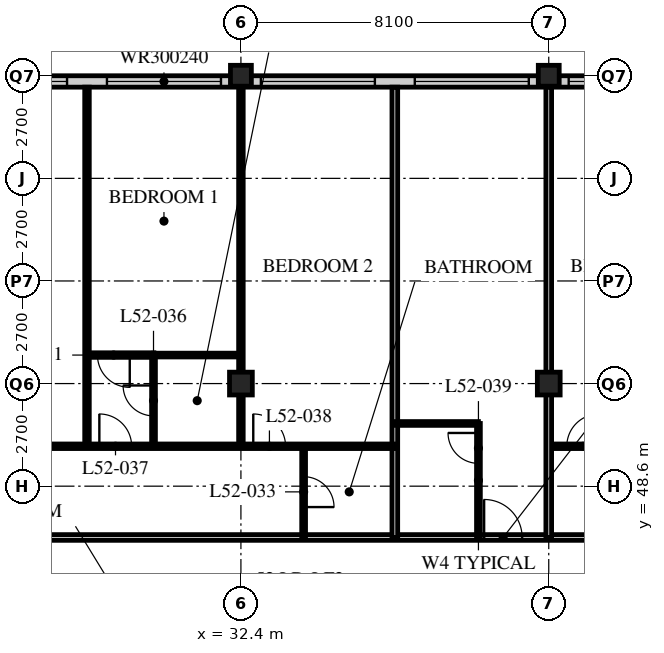
"""IFC4 building model, lengths in metres.
Left out: names, types, materials, properties, quantities, classifications, styles, units other than length and angle.
Written with IfcOpenShell. Run it as: python <this file> out.ifc"""

import sys

from ifc_helpers import new_model, si_unit, direction, frame, frame_2d, origin, origin_2d, place, context, subcontext, project, spatial, rectangle, hollow_rectangle, extrude, element, fill, save


model = new_model("IFC4")
c1 = context("Model", 3, precision=1e-05, world=origin(), true_north=direction((0.0, 1.0)))
c2 = subcontext(c1, "Body", "Model", "MODEL_VIEW")
j1 = project(units=[si_unit("LENGTHUNIT", "METRE"), si_unit("PLANEANGLEUNIT", "RADIAN")], contexts=[c1])
p1 = place(None, origin())
s1 = spatial("IfcSite", under=j1, at=p1, CompositionType="ELEMENT")
p2 = place(p1, origin())
s2 = spatial("IfcBuilding", under=s1, at=p2, CompositionType="ELEMENT")
p3 = place(p2, frame((0.0, 0.0, 202.8)))
s3 = spatial("IfcBuildingStorey", under=s2, at=p3, CompositionType="ELEMENT", Elevation=202.8)
p4 = place(p3, frame((32.4, 51.3, 0.0), z_axis=(0.0, 0.0, 1.0), x_axis=(1.0, 0.0, 0.0)))
e1 = element("IfcColumn", 1, at=p4, inside=s3, PredefinedType="COLUMN", context=c2, shape_type="SweptSolid", body=[
    extrude(hollow_rectangle(XDim=0.6, YDim=0.6, WallThickness=0.05, at=origin_2d()), origin(), (0.0, 0.0, 1.0), 3.6),
])
p5 = place(p3, frame((32.4, 59.4, 0.0), z_axis=(0.0, 0.0, 1.0), x_axis=(1.0, 0.0, 0.0)))
e2 = element("IfcColumn", 2, at=p5, inside=s3, PredefinedType="COLUMN", context=c2, shape_type="SweptSolid", body=[
    extrude(hollow_rectangle(XDim=0.55, YDim=0.55, WallThickness=0.045, at=origin_2d()), origin(), (0.0, 0.0, 1.0), 3.6),
])
p6 = place(p3, frame((40.5, 51.3, 0.0), z_axis=(0.0, 0.0, 1.0), x_axis=(1.0, 0.0, 0.0)))
e3 = element("IfcColumn", 3, at=p6, inside=s3, PredefinedType="COLUMN", context=c2, shape_type="SweptSolid", body=[
    extrude(hollow_rectangle(XDim=0.6, YDim=0.6, WallThickness=0.05, at=origin_2d()), origin(), (0.0, 0.0, 1.0), 3.6),
])
p7 = place(p3, frame((40.5, 59.4, 0.0), z_axis=(0.0, 0.0, 1.0), x_axis=(1.0, 0.0, 0.0)))
e4 = element("IfcColumn", 4, at=p7, inside=s3, PredefinedType="COLUMN", context=c2, shape_type="SweptSolid", body=[
    extrude(hollow_rectangle(XDim=0.55, YDim=0.55, WallThickness=0.045, at=origin_2d()), origin(), (0.0, 0.0, 1.0), 3.6),
])
p8 = place(p3, frame((48.3, 59.25, 0.0), z_axis=(0.0, 0.0, 1.0), x_axis=(-1.0, 0.0, 0.0)))
e5 = element("IfcWall", 5, at=p8, inside=s3, PredefinedType="SOLIDWALL", context=c2, shape_type="SweptSolid", body=[
    extrude(rectangle(XDim=40.2, YDim=0.3, at=frame_2d((20.1, 0.0))), origin(), (0.0, 0.0, 1.0), 3.39),
])
p9 = place(p8, frame((0.225, 0.0, 0.6)))
e6 = element("IfcOpeningElement", 6, at=p9, cuts=e5, PredefinedType="OPENING", context=c2, shape_type="SweptSolid", body=[
    extrude(rectangle(XDim=3.0, YDim=2.4, at=frame_2d((1.5, 1.2))), frame((0.0, 0.16, 0.0), z_axis=(0.0, -1.0, 0.0), x_axis=(1.0, 0.0, 0.0)), (0.0, 0.0, 1.0), 0.32),
])
p10 = place(p8, frame((4.275, 0.0, 0.6)))
e7 = element("IfcOpeningElement", 7, at=p10, cuts=e5, PredefinedType="OPENING", context=c2, shape_type="SweptSolid", body=[
    extrude(rectangle(XDim=3.0, YDim=2.4, at=frame_2d((1.5, 1.2))), frame((0.0, 0.16, 0.0), z_axis=(0.0, -1.0, 0.0), x_axis=(1.0, 0.0, 0.0)), (0.0, 0.0, 1.0), 0.32),
])
p11 = place(p8, frame((8.325, 0.0, 0.6)))
e8 = element("IfcOpeningElement", 8, at=p11, cuts=e5, PredefinedType="OPENING", context=c2, shape_type="SweptSolid", body=[
    extrude(rectangle(XDim=3.0, YDim=2.4, at=frame_2d((1.5, 1.2))), frame((0.0, 0.16, 0.0), z_axis=(0.0, -1.0, 0.0), x_axis=(1.0, 0.0, 0.0)), (0.0, 0.0, 1.0), 0.32),
])
p12 = place(p8, frame((12.375, 0.0, 0.6)))
e9 = element("IfcOpeningElement", 9, at=p12, cuts=e5, PredefinedType="OPENING", context=c2, shape_type="SweptSolid", body=[
    extrude(rectangle(XDim=3.0, YDim=2.4, at=frame_2d((1.5, 1.2))), frame((0.0, 0.16, 0.0), z_axis=(0.0, -1.0, 0.0), x_axis=(1.0, 0.0, 0.0)), (0.0, 0.0, 1.0), 0.32),
])
p13 = place(p8, frame((16.425, 0.0, 0.6)))
e10 = element("IfcOpeningElement", 10, at=p13, cuts=e5, PredefinedType="OPENING", context=c2, shape_type="SweptSolid", body=[
    extrude(rectangle(XDim=3.0, YDim=2.4, at=frame_2d((1.5, 1.2))), frame((0.0, 0.16, 0.0), z_axis=(0.0, -1.0, 0.0), x_axis=(1.0, 0.0, 0.0)), (0.0, 0.0, 1.0), 0.32),
])
p14 = place(p8, frame((20.475, 0.0, 0.6)))
e11 = element("IfcOpeningElement", 11, at=p14, cuts=e5, PredefinedType="OPENING", context=c2, shape_type="SweptSolid", body=[
    extrude(rectangle(XDim=3.0, YDim=2.4, at=frame_2d((1.5, 1.2))), frame((0.0, 0.16, 0.0), z_axis=(0.0, -1.0, 0.0), x_axis=(1.0, 0.0, 0.0)), (0.0, 0.0, 1.0), 0.32),
])
p15 = place(p8, frame((24.525, 0.0, 0.6)))
e12 = element("IfcOpeningElement", 12, at=p15, cuts=e5, PredefinedType="OPENING", context=c2, shape_type="SweptSolid", body=[
    extrude(rectangle(XDim=3.0, YDim=2.4, at=frame_2d((1.5, 1.2))), frame((0.0, 0.16, 0.0), z_axis=(0.0, -1.0, 0.0), x_axis=(1.0, 0.0, 0.0)), (0.0, 0.0, 1.0), 0.32),
])
p16 = place(p8, frame((28.575, 0.0, 0.6)))
e13 = element("IfcOpeningElement", 13, at=p16, cuts=e5, PredefinedType="OPENING", context=c2, shape_type="SweptSolid", body=[
    extrude(rectangle(XDim=3.0, YDim=2.4, at=frame_2d((1.5, 1.2))), frame((0.0, 0.16, 0.0), z_axis=(0.0, -1.0, 0.0), x_axis=(1.0, 0.0, 0.0)), (0.0, 0.0, 1.0), 0.32),
])
p17 = place(p8, frame((32.625, 0.0, 0.6)))
e14 = element("IfcOpeningElement", 14, at=p17, cuts=e5, PredefinedType="OPENING", context=c2, shape_type="SweptSolid", body=[
    extrude(rectangle(XDim=3.0, YDim=2.4, at=frame_2d((1.5, 1.2))), frame((0.0, 0.16, 0.0), z_axis=(0.0, -1.0, 0.0), x_axis=(1.0, 0.0, 0.0)), (0.0, 0.0, 1.0), 0.32),
])
p18 = place(p8, frame((36.675, 0.0, 0.6)))
e15 = element("IfcOpeningElement", 15, at=p18, cuts=e5, PredefinedType="OPENING", context=c2, shape_type="SweptSolid", body=[
    extrude(rectangle(XDim=3.0, YDim=2.4, at=frame_2d((1.5, 1.2))), frame((0.0, 0.16, 0.0), z_axis=(0.0, -1.0, 0.0), x_axis=(1.0, 0.0, 0.0)), (0.0, 0.0, 1.0), 0.32),
])
p19 = place(p3, frame((8.1, 47.25, 0.0), z_axis=(0.0, 0.0, 1.0), x_axis=(1.0, 0.0, 0.0)))
e16 = element("IfcWall", 16, at=p19, inside=s3, PredefinedType="PARTITIONING", context=c2, shape_type="SweptSolid", body=[
    extrude(rectangle(XDim=36.45, YDim=0.15, at=frame_2d((18.225, 0.0))), origin(), (0.0, 0.0, 1.0), 3.39),
])
p20 = place(p19, frame((4.45, 0.0, 0.0)))
e17 = element("IfcOpeningElement", 17, at=p20, cuts=e16, PredefinedType="OPENING", context=c2, shape_type="SweptSolid", body=[
    extrude(rectangle(XDim=1.0, YDim=2.1, at=frame_2d((0.5, 1.05))), frame((0.0, 0.085, 0.0), z_axis=(0.0, -1.0, 0.0), x_axis=(1.0, 0.0, 0.0)), (0.0, 0.0, 1.0), 0.17),
])
p21 = place(p19, frame((12.55, 0.0, 0.0)))
e18 = element("IfcOpeningElement", 18, at=p21, cuts=e16, PredefinedType="OPENING", context=c2, shape_type="SweptSolid", body=[
    extrude(rectangle(XDim=1.0, YDim=2.1, at=frame_2d((0.5, 1.05))), frame((0.0, 0.085, 0.0), z_axis=(0.0, -1.0, 0.0), x_axis=(1.0, 0.0, 0.0)), (0.0, 0.0, 1.0), 0.17),
])
p22 = place(p19, frame((30.7, 0.0, 0.0)))
e19 = element("IfcOpeningElement", 19, at=p22, cuts=e16, PredefinedType="OPENING", context=c2, shape_type="SweptSolid", body=[
    extrude(rectangle(XDim=1.0, YDim=2.1, at=frame_2d((0.5, 1.05))), frame((0.0, 0.085, 0.0), z_axis=(0.0, -1.0, 0.0), x_axis=(1.0, 0.0, 0.0)), (0.0, 0.0, 1.0), 0.17),
])
p23 = place(p19, frame((33.925, 0.0, 0.0)))
e20 = element("IfcOpeningElement", 20, at=p23, cuts=e16, PredefinedType="OPENING", context=c2, shape_type="SweptSolid", body=[
    extrude(rectangle(XDim=1.0, YDim=2.1, at=frame_2d((0.5, 1.05))), frame((0.0, 0.085, 0.0), z_axis=(0.0, -1.0, 0.0), x_axis=(1.0, 0.0, 0.0)), (0.0, 0.0, 1.0), 0.17),
])
p24 = place(p19, frame((1.525, 0.0, 0.0)))
e21 = element("IfcOpeningElement", 21, at=p24, cuts=e16, PredefinedType="OPENING", context=c2, shape_type="SweptSolid", body=[
    extrude(rectangle(XDim=1.0, YDim=2.1, at=frame_2d((0.5, 1.05))), frame((0.0, 0.085, 0.0), z_axis=(0.0, -1.0, 0.0), x_axis=(1.0, 0.0, 0.0)), (0.0, 0.0, 1.0), 0.17),
])
p25 = place(p3, frame((34.05, 47.25, 0.0), z_axis=(0.0, 0.0, 1.0), x_axis=(0.0, 1.0, 0.0)))
e22 = element("IfcWall", 22, at=p25, inside=s3, PredefinedType="PARTITIONING", context=c2, shape_type="SweptSolid", body=[
    extrude(rectangle(XDim=2.4, YDim=0.1, at=frame_2d((1.2, 0.0))), origin(), (0.0, 0.0, 1.0), 3.39),
])
p26 = place(p25, frame((0.8, 0.0, 0.0)))
e23 = element("IfcOpeningElement", 23, at=p26, cuts=e22, PredefinedType="OPENING", context=c2, shape_type="SweptSolid", body=[
    extrude(rectangle(XDim=0.8, YDim=2.1, at=frame_2d((0.4, 1.05))), frame((0.0, 0.06, 0.0), z_axis=(0.0, -1.0, 0.0), x_axis=(1.0, 0.0, 0.0)), (0.0, 0.0, 1.0), 0.12),
])
p27 = place(p3, frame((30.1, 49.65, 0.0), z_axis=(0.0, 0.0, 1.0), x_axis=(0.0, 1.0, 0.0)))
e24 = element("IfcWall", 24, at=p27, inside=s3, PredefinedType="PARTITIONING", context=c2, shape_type="SweptSolid", body=[
    extrude(rectangle(XDim=2.4, YDim=0.1, at=frame_2d((1.2, 0.0))), origin(), (0.0, 0.0, 1.0), 3.39),
])
p28 = place(p27, frame((0.8, 0.0, 0.0)))
e25 = element("IfcOpeningElement", 25, at=p28, cuts=e24, PredefinedType="OPENING", context=c2, shape_type="SweptSolid", body=[
    extrude(rectangle(XDim=0.8, YDim=2.1, at=frame_2d((0.4, 1.05))), frame((0.0, 0.06, 0.0), z_axis=(0.0, -1.0, 0.0), x_axis=(1.0, 0.0, 0.0)), (0.0, 0.0, 1.0), 0.12),
])
p29 = place(p3, frame((30.1, 52.05, 0.0), z_axis=(0.0, 0.0, 1.0), x_axis=(1.0, 0.0, 0.0)))
e26 = element("IfcWall", 26, at=p29, inside=s3, PredefinedType="PARTITIONING", context=c2, shape_type="SweptSolid", body=[
    extrude(rectangle(XDim=2.3, YDim=0.1, at=frame_2d((1.15, 0.0))), origin(), (0.0, 0.0, 1.0), 3.39),
])
p30 = place(p3, frame((28.35, 49.65, 0.0), z_axis=(0.0, 0.0, 1.0), x_axis=(0.0, 1.0, 0.0)))
e27 = element("IfcWall", 27, at=p30, inside=s3, PredefinedType="PARTITIONING", context=c2, shape_type="SweptSolid", body=[
    extrude(rectangle(XDim=9.45, YDim=0.12, at=frame_2d((4.725, 0.0))), origin(), (0.0, 0.0, 1.0), 3.39),
])
p31 = place(p3, frame((32.4, 49.65, 0.0), z_axis=(0.0, 0.0, 1.0), x_axis=(0.0, 1.0, 0.0)))
e28 = element("IfcWall", 28, at=p31, inside=s3, PredefinedType="PARTITIONING", context=c2, shape_type="SweptSolid", body=[
    extrude(rectangle(XDim=9.45, YDim=0.12, at=frame_2d((4.725, 0.0))), origin(), (0.0, 0.0, 1.0), 2.778),
])
p32 = place(p3, frame((36.45, 47.25, 0.0), z_axis=(0.0, 0.0, 1.0), x_axis=(0.0, 1.0, 0.0)))
e29 = element("IfcWall", 29, at=p32, inside=s3, PredefinedType="PARTITIONING", context=c2, shape_type="SweptSolid", body=[
    extrude(rectangle(XDim=11.85, YDim=0.15, at=frame_2d((5.925, 0.0))), origin(), (0.0, 0.0, 1.0), 3.39),
])
p33 = place(p3, frame((36.45, 50.25, 0.0), z_axis=(0.0, 0.0, 1.0), x_axis=(1.0, 0.0, 0.0)))
e30 = element("IfcWall", 30, at=p33, inside=s3, PredefinedType="PARTITIONING", context=c2, shape_type="SweptSolid", body=[
    extrude(rectangle(XDim=2.2, YDim=0.1, at=frame_2d((1.1, 0.0))), origin(), (0.0, 0.0, 1.0), 3.39),
])
p34 = place(p3, frame((38.65, 47.25, 0.0), z_axis=(0.0, 0.0, 1.0), x_axis=(0.0, 1.0, 0.0)))
e31 = element("IfcWall", 31, at=p34, inside=s3, PredefinedType="PARTITIONING", context=c2, shape_type="SweptSolid", body=[
    extrude(rectangle(XDim=3.0, YDim=0.1, at=frame_2d((1.5, 0.0))), origin(), (0.0, 0.0, 1.0), 3.39),
])
p35 = place(p34, frame((1.95, 0.0, 0.0)))
e32 = element("IfcOpeningElement", 32, at=p35, cuts=e31, PredefinedType="OPENING", context=c2, shape_type="SweptSolid", body=[
    extrude(rectangle(XDim=0.8, YDim=2.1, at=frame_2d((0.4, 1.05))), frame((0.0, 0.06, 0.0), z_axis=(0.0, -1.0, 0.0), x_axis=(1.0, 0.0, 0.0)), (0.0, 0.0, 1.0), 0.12),
])
p36 = place(p3, frame((40.5, 49.65, 0.0), z_axis=(0.0, 0.0, 1.0), x_axis=(1.0, 0.0, 0.0)))
e33 = element("IfcWall", 33, at=p36, inside=s3, PredefinedType="PARTITIONING", context=c2, shape_type="SweptSolid", body=[
    extrude(rectangle(XDim=8.05, YDim=0.12, at=frame_2d((4.025, 0.0))), origin(), (0.0, 0.0, 1.0), 3.39),
])
p37 = place(p36, frame((0.475, 0.0, 0.0)))
e34 = element("IfcOpeningElement", 34, at=p37, cuts=e33, PredefinedType="OPENING", context=c2, shape_type="SweptSolid", body=[
    extrude(rectangle(XDim=0.85, YDim=2.1, at=frame_2d((0.425, 1.05))), frame((0.0, 0.07, 0.0), z_axis=(0.0, -1.0, 0.0), x_axis=(1.0, 0.0, 0.0)), (0.0, 0.0, 1.0), 0.14),
])
p38 = place(p36, frame((4.325, 0.0, 0.0)))
e35 = element("IfcOpeningElement", 35, at=p38, cuts=e33, PredefinedType="OPENING", context=c2, shape_type="SweptSolid", body=[
    extrude(rectangle(XDim=0.85, YDim=2.1, at=frame_2d((0.425, 1.05))), frame((0.0, 0.07, 0.0), z_axis=(0.0, -1.0, 0.0), x_axis=(1.0, 0.0, 0.0)), (0.0, 0.0, 1.0), 0.14),
])
p39 = place(p3, frame((40.5, 47.25, 0.0), z_axis=(0.0, 0.0, 1.0), x_axis=(0.0, 1.0, 0.0)))
e36 = element("IfcWall", 36, at=p39, inside=s3, PredefinedType="PARTITIONING", context=c2, shape_type="SweptSolid", body=[
    extrude(rectangle(XDim=11.85, YDim=0.15, at=frame_2d((5.925, 0.0))), origin(), (0.0, 0.0, 1.0), 2.778),
])
p40 = place(p3, frame((4.1, 49.65, 0.0), z_axis=(0.0, 0.0, 1.0), x_axis=(1.0, 0.0, 0.0)))
e37 = element("IfcWall", 37, at=p40, inside=s3, PredefinedType="PARTITIONING", context=c2, shape_type="SweptSolid", body=[
    extrude(rectangle(XDim=32.35, YDim=0.12, at=frame_2d((16.175, 0.0))), origin(), (0.0, 0.0, 1.0), 3.39),
])
p41 = place(p40, frame((9.025, 0.0, 0.0)))
e38 = element("IfcOpeningElement", 38, at=p41, cuts=e37, PredefinedType="OPENING", context=c2, shape_type="SweptSolid", body=[
    extrude(rectangle(XDim=0.85, YDim=2.1, at=frame_2d((0.425, 1.05))), frame((0.0, 0.07, 0.0), z_axis=(0.0, -1.0, 0.0), x_axis=(1.0, 0.0, 0.0)), (0.0, 0.0, 1.0), 0.14),
])
p42 = place(p40, frame((12.425, 0.0, 0.0)))
e39 = element("IfcOpeningElement", 39, at=p42, cuts=e37, PredefinedType="OPENING", context=c2, shape_type="SweptSolid", body=[
    extrude(rectangle(XDim=0.85, YDim=2.1, at=frame_2d((0.425, 1.05))), frame((0.0, 0.07, 0.0), z_axis=(0.0, -1.0, 0.0), x_axis=(1.0, 0.0, 0.0)), (0.0, 0.0, 1.0), 0.14),
])
p43 = place(p40, frame((17.125, 0.0, 0.0)))
e40 = element("IfcOpeningElement", 40, at=p43, cuts=e37, PredefinedType="OPENING", context=c2, shape_type="SweptSolid", body=[
    extrude(rectangle(XDim=0.85, YDim=2.1, at=frame_2d((0.425, 1.05))), frame((0.0, 0.07, 0.0), z_axis=(0.0, -1.0, 0.0), x_axis=(1.0, 0.0, 0.0)), (0.0, 0.0, 1.0), 0.14),
])
p44 = place(p40, frame((24.575, 0.0, 0.0)))
e41 = element("IfcOpeningElement", 41, at=p44, cuts=e37, PredefinedType="OPENING", context=c2, shape_type="SweptSolid", body=[
    extrude(rectangle(XDim=0.85, YDim=2.1, at=frame_2d((0.425, 1.05))), frame((0.0, 0.07, 0.0), z_axis=(0.0, -1.0, 0.0), x_axis=(1.0, 0.0, 0.0)), (0.0, 0.0, 1.0), 0.14),
])
p45 = place(p40, frame((28.625, 0.0, 0.0)))
e42 = element("IfcOpeningElement", 42, at=p45, cuts=e37, PredefinedType="OPENING", context=c2, shape_type="SweptSolid", body=[
    extrude(rectangle(XDim=0.85, YDim=2.1, at=frame_2d((0.425, 1.05))), frame((0.0, 0.07, 0.0), z_axis=(0.0, -1.0, 0.0), x_axis=(1.0, 0.0, 0.0)), (0.0, 0.0, 1.0), 0.14),
])
p46 = place(p40, frame((6.725, 0.0, 0.0)))
e43 = element("IfcOpeningElement", 43, at=p46, cuts=e37, PredefinedType="OPENING", context=c2, shape_type="SweptSolid", body=[
    extrude(rectangle(XDim=0.85, YDim=2.1, at=frame_2d((0.425, 1.05))), frame((0.0, 0.07, 0.0), z_axis=(0.0, -1.0, 0.0), x_axis=(1.0, 0.0, 0.0)), (0.0, 0.0, 1.0), 0.14),
])
p47 = place(p40, frame((2.875, 0.0, 0.0)))
e44 = element("IfcOpeningElement", 44, at=p47, cuts=e37, PredefinedType="OPENING", context=c2, shape_type="SweptSolid", body=[
    extrude(rectangle(XDim=0.85, YDim=2.1, at=frame_2d((0.425, 1.05))), frame((0.0, 0.07, 0.0), z_axis=(0.0, -1.0, 0.0), x_axis=(1.0, 0.0, 0.0)), (0.0, 0.0, 1.0), 0.14),
])
p48 = place(p3, frame((28.35, 52.05, 0.0), z_axis=(0.0, 0.0, 1.0), x_axis=(1.0, 0.0, 0.0)))
e45 = element("IfcWall", 45, at=p48, inside=s3, PredefinedType="PARTITIONING", context=c2, shape_type="SweptSolid", body=[
    extrude(rectangle(XDim=1.76, YDim=0.12, at=frame_2d((0.88, 0.0))), origin(), (0.0, 0.0, 1.0), 3.39),
])
p49 = place(p48, frame((0.275, 0.0, 0.0)))
e46 = element("IfcOpeningElement", 46, at=p49, cuts=e45, PredefinedType="OPENING", context=c2, shape_type="SweptSolid", body=[
    extrude(rectangle(XDim=0.85, YDim=2.1, at=frame_2d((0.425, 1.05))), frame((0.0, 0.07, 0.0), z_axis=(0.0, -1.0, 0.0), x_axis=(1.0, 0.0, 0.0)), (0.0, 0.0, 1.0), 0.14),
])
p50 = place(p10, origin())
e47 = element("IfcWindow", 47, at=p50, inside=s3, PartitioningType="SINGLE_PANEL", PredefinedType="WINDOW", context=c2, shape_type="SweptSolid", body=[
    extrude(rectangle(XDim=3.0, YDim=2.4, at=frame_2d((1.5, 1.2))), frame((0.0, 0.03, 0.0), z_axis=(0.0, -1.0, 0.0), x_axis=(1.0, 0.0, 0.0)), (0.0, 0.0, 1.0), 0.06),
])
fill(e7, e47)
p51 = place(p11, origin())
e48 = element("IfcWindow", 48, at=p51, inside=s3, PartitioningType="SINGLE_PANEL", PredefinedType="WINDOW", context=c2, shape_type="SweptSolid", body=[
    extrude(rectangle(XDim=3.0, YDim=2.4, at=frame_2d((1.5, 1.2))), frame((0.0, 0.03, 0.0), z_axis=(0.0, -1.0, 0.0), x_axis=(1.0, 0.0, 0.0)), (0.0, 0.0, 1.0), 0.06),
])
fill(e8, e48)
p52 = place(p12, origin())
e49 = element("IfcWindow", 49, at=p52, inside=s3, PartitioningType="SINGLE_PANEL", PredefinedType="WINDOW", context=c2, shape_type="SweptSolid", body=[
    extrude(rectangle(XDim=3.0, YDim=2.4, at=frame_2d((1.5, 1.2))), frame((0.0, 0.03, 0.0), z_axis=(0.0, -1.0, 0.0), x_axis=(1.0, 0.0, 0.0)), (0.0, 0.0, 1.0), 0.06),
])
fill(e9, e49)
p53 = place(p13, origin())
e50 = element("IfcWindow", 50, at=p53, inside=s3, PartitioningType="SINGLE_PANEL", PredefinedType="WINDOW", context=c2, shape_type="SweptSolid", body=[
    extrude(rectangle(XDim=3.0, YDim=2.4, at=frame_2d((1.5, 1.2))), frame((0.0, 0.03, 0.0), z_axis=(0.0, -1.0, 0.0), x_axis=(1.0, 0.0, 0.0)), (0.0, 0.0, 1.0), 0.06),
])
fill(e10, e50)
p54 = place(p14, origin())
e51 = element("IfcWindow", 51, at=p54, inside=s3, PartitioningType="SINGLE_PANEL", PredefinedType="WINDOW", context=c2, shape_type="SweptSolid", body=[
    extrude(rectangle(XDim=3.0, YDim=2.4, at=frame_2d((1.5, 1.2))), frame((0.0, 0.03, 0.0), z_axis=(0.0, -1.0, 0.0), x_axis=(1.0, 0.0, 0.0)), (0.0, 0.0, 1.0), 0.06),
])
fill(e11, e51)
p55 = place(p26, origin())
e52 = element("IfcDoor", 52, at=p55, inside=s3, OperationType="SINGLE_SWING_RIGHT", PredefinedType="DOOR", context=c2, shape_type="SweptSolid", body=[
    extrude(rectangle(XDim=0.8, YDim=2.1, at=frame_2d((0.4, 1.05))), frame((0.0, 0.025, 0.0), z_axis=(0.0, -1.0, 0.0), x_axis=(1.0, 0.0, 0.0)), (0.0, 0.0, 1.0), 0.05),
])
fill(e23, e52)
p56 = place(p28, origin())
e53 = element("IfcDoor", 53, at=p56, inside=s3, OperationType="SINGLE_SWING_RIGHT", PredefinedType="DOOR", context=c2, shape_type="SweptSolid", body=[
    extrude(rectangle(XDim=0.8, YDim=2.1, at=frame_2d((0.4, 1.05))), frame((0.0, 0.025, 0.0), z_axis=(0.0, -1.0, 0.0), x_axis=(1.0, 0.0, 0.0)), (0.0, 0.0, 1.0), 0.05),
])
fill(e25, e53)
p57 = place(p44, origin())
e54 = element("IfcDoor", 54, at=p57, inside=s3, OperationType="SINGLE_SWING_LEFT", PredefinedType="DOOR", context=c2, shape_type="SweptSolid", body=[
    extrude(rectangle(XDim=0.85, YDim=2.1, at=frame_2d((0.425, 1.05))), frame((0.0, 0.025, 0.0), z_axis=(0.0, -1.0, 0.0), x_axis=(1.0, 0.0, 0.0)), (0.0, 0.0, 1.0), 0.05),
])
fill(e41, e54)
p58 = place(p45, origin())
e55 = element("IfcDoor", 55, at=p58, inside=s3, OperationType="SINGLE_SWING_LEFT", PredefinedType="DOOR", context=c2, shape_type="SweptSolid", body=[
    extrude(rectangle(XDim=0.85, YDim=2.1, at=frame_2d((0.425, 1.05))), frame((0.0, 0.025, 0.0), z_axis=(0.0, -1.0, 0.0), x_axis=(1.0, 0.0, 0.0)), (0.0, 0.0, 1.0), 0.05),
])
fill(e42, e55)
p59 = place(p35, origin())
e56 = element("IfcDoor", 56, at=p59, inside=s3, OperationType="SINGLE_SWING_RIGHT", PredefinedType="DOOR", context=c2, shape_type="SweptSolid", body=[
    extrude(rectangle(XDim=0.8, YDim=2.1, at=frame_2d((0.4, 1.05))), frame((0.0, 0.025, 0.0), z_axis=(0.0, -1.0, 0.0), x_axis=(1.0, 0.0, 0.0)), (0.0, 0.0, 1.0), 0.05),
])
fill(e32, e56)
p60 = place(p22, origin())
e57 = element("IfcDoor", 57, at=p60, inside=s3, OperationType="SINGLE_SWING_LEFT", PredefinedType="DOOR", context=c2, shape_type="SweptSolid", body=[
    extrude(rectangle(XDim=1.0, YDim=2.1, at=frame_2d((0.5, 1.05))), frame((0.0, 0.025, 0.0), z_axis=(0.0, -1.0, 0.0), x_axis=(1.0, 0.0, 0.0)), (0.0, 0.0, 1.0), 0.05),
])
fill(e19, e57)
p61 = place(p37, origin())
e58 = element("IfcDoor", 58, at=p61, inside=s3, OperationType="SINGLE_SWING_RIGHT", PredefinedType="DOOR", context=c2, shape_type="SweptSolid", body=[
    extrude(rectangle(XDim=0.85, YDim=2.1, at=frame_2d((0.425, 1.05))), frame((0.0, 0.025, 0.0), z_axis=(0.0, -1.0, 0.0), x_axis=(1.0, 0.0, 0.0)), (0.0, 0.0, 1.0), 0.05),
])
fill(e34, e58)
p62 = place(p49, origin())
e59 = element("IfcDoor", 59, at=p62, inside=s3, OperationType="SINGLE_SWING_LEFT", PredefinedType="DOOR", context=c2, shape_type="SweptSolid", body=[
    extrude(rectangle(XDim=0.85, YDim=2.1, at=frame_2d((0.425, 1.05))), frame((0.0, 0.025, 0.0), z_axis=(0.0, -1.0, 0.0), x_axis=(1.0, 0.0, 0.0)), (0.0, 0.0, 1.0), 0.05),
])
fill(e46, e59)
save(model, sys.argv[1])
